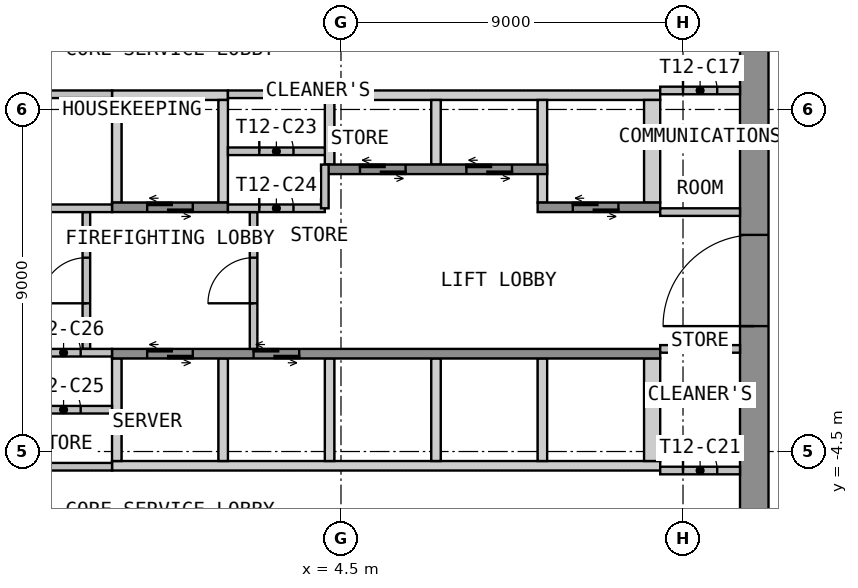
"""IFC4 building model, lengths in metres.
Left out: names, types, materials, properties, quantities, classifications, styles, units other than length and angle.
Written with IfcOpenShell. Run it as: python <this file> out.ifc"""

import sys

from ifc_helpers import new_model, si_unit, direction, frame, frame_2d, origin, place, context, subcontext, project, spatial, polyline, rectangle, outline, extrude, element, fill, save


model = new_model("IFC4")
c1 = context("Model", 3, precision=1e-05, world=origin(), true_north=direction((0.0, 1.0)))
c2 = subcontext(c1, "Body", "Model", "MODEL_VIEW")
j1 = project(units=[si_unit("LENGTHUNIT", "METRE"), si_unit("PLANEANGLEUNIT", "RADIAN")], contexts=[c1])
p1 = place(None, origin())
s1 = spatial("IfcSite", under=j1, at=p1, CompositionType="ELEMENT")
p2 = place(p1, origin())
s2 = spatial("IfcBuilding", under=s1, at=p2, CompositionType="ELEMENT")
p3 = place(p2, frame((0.0, 0.0, 167.7)))
s3 = spatial("IfcBuildingStorey", under=s2, at=p3, CompositionType="ELEMENT", Elevation=167.7)
p4 = place(p3, frame((15.375, -12.75, 0.0), z_axis=(0.0, 0.0, 1.0), x_axis=(0.0, 1.0, 0.0)))
e1 = element("IfcWall", 1, at=p4, inside=s3, PredefinedType="SHEAR", context=c2, shape_type="SweptSolid", body=[
    extrude(rectangle(XDim=25.5, YDim=0.75, at=frame_2d((12.75, 0.0))), origin(), (0.0, 0.0, 1.0), 3.575),
])
p5 = place(p4, frame((11.55, 0.0, 0.0)))
e2 = element("IfcOpeningElement", 2, at=p5, cuts=e1, PredefinedType="OPENING", context=c2, shape_type="SweptSolid", body=[
    extrude(rectangle(XDim=2.4, YDim=2.1, at=frame_2d((1.2, 1.05))), frame((0.0, 0.385, 0.0), z_axis=(0.0, -1.0, 0.0), x_axis=(1.0, 0.0, 0.0)), (0.0, 0.0, 1.0), 0.77),
])
p6 = place(p3, origin())
e3 = element("IfcWall", 3, at=p6, inside=s3, PredefinedType="SHEAR", context=c2, shape_type="SweptSolid", body=[
    extrude(outline(polyline([(-1.525, 4.75), (1.525, 4.75), (1.525, 5.0), (-1.525, 5.0), (-1.525, 4.75)])), origin(), (0.0, 0.0, 1.0), 3.575),
])
p7 = place(p3, origin())
e4 = element("IfcWall", 4, at=p7, inside=s3, PredefinedType="SHEAR", context=c2, shape_type="SweptSolid", body=[
    extrude(outline(polyline([(4.075, 4.75), (12.9, 4.75), (12.9, 5.0), (4.075, 5.0), (4.075, 4.75)])), origin(), (0.0, 0.0, 1.0), 3.575),
])
p8 = place(p3, origin())
e5 = element("IfcWall", 5, at=p8, inside=s3, PredefinedType="SHEAR", context=c2, shape_type="SweptSolid", body=[
    extrude(outline(polyline([(-1.525, 2.05), (-1.275, 2.05), (-1.275, 4.75), (-1.525, 4.75), (-1.525, 2.05)])), origin(), (0.0, 0.0, 1.0), 3.575),
])
p9 = place(p3, origin())
e6 = element("IfcWall", 6, at=p9, inside=s3, PredefinedType="SHEAR", context=c2, shape_type="SweptSolid", body=[
    extrude(outline(polyline([(1.275, 2.05), (1.525, 2.05), (1.525, 4.75), (1.275, 4.75), (1.275, 2.05)])), origin(), (0.0, 0.0, 1.0), 3.575),
])
p10 = place(p3, origin())
e7 = element("IfcWall", 7, at=p10, inside=s3, PredefinedType="SHEAR", context=c2, shape_type="SweptSolid", body=[
    extrude(outline(polyline([(9.675, 2.05), (9.925, 2.05), (9.925, 4.75), (9.675, 4.75), (9.675, 2.05)])), origin(), (0.0, 0.0, 1.0), 3.575),
])
p11 = place(p3, origin())
e8 = element("IfcWall", 8, at=p11, inside=s3, PredefinedType="SHEAR", context=c2, shape_type="SweptSolid", body=[
    extrude(outline(polyline([(12.475, 2.05), (12.9, 2.05), (12.9, 4.75), (12.475, 4.75), (12.475, 2.05)])), origin(), (0.0, 0.0, 1.0), 3.575),
])
p12 = place(p3, origin())
e9 = element("IfcWall", 9, at=p12, inside=s3, PredefinedType="SHEAR", context=c2, shape_type="SweptSolid", body=[
    extrude(outline(polyline([(4.075, 3.05), (4.325, 3.05), (4.325, 4.75), (4.075, 4.75), (4.075, 3.05)])), origin(), (0.0, 0.0, 1.0), 3.575),
])
p13 = place(p3, origin())
e10 = element("IfcWall", 10, at=p13, inside=s3, PredefinedType="SHEAR", context=c2, shape_type="SweptSolid", body=[
    extrude(outline(polyline([(6.875, 3.05), (7.125, 3.05), (7.125, 4.75), (6.875, 4.75), (6.875, 3.05)])), origin(), (0.0, 0.0, 1.0), 3.575),
])
p14 = place(p3, frame((-1.525, 1.925, 0.0), z_axis=(0.0, 0.0, 1.0), x_axis=(1.0, 0.0, 0.0)))
e11 = element("IfcWall", 11, at=p14, inside=s3, PredefinedType="SHEAR", context=c2, shape_type="SweptSolid", body=[
    extrude(rectangle(XDim=3.05, YDim=0.25, at=frame_2d((1.525, 0.0))), origin(), (0.0, 0.0, 1.0), 3.575),
])
p15 = place(p14, frame((0.925, 0.0, 0.0)))
e12 = element("IfcOpeningElement", 12, at=p15, cuts=e11, PredefinedType="OPENING", context=c2, shape_type="SweptSolid", body=[
    extrude(rectangle(XDim=1.2, YDim=2.1, at=frame_2d((0.6, 1.05))), frame((0.0, 0.135, 0.0), z_axis=(0.0, -1.0, 0.0), x_axis=(1.0, 0.0, 0.0)), (0.0, 0.0, 1.0), 0.27),
])
p16 = place(p3, frame((4.075, 2.925, 0.0), z_axis=(0.0, 0.0, 1.0), x_axis=(1.0, 0.0, 0.0)))
e13 = element("IfcWall", 13, at=p16, inside=s3, PredefinedType="SHEAR", context=c2, shape_type="SweptSolid", body=[
    extrude(rectangle(XDim=5.85, YDim=0.25, at=frame_2d((2.925, 0.0))), origin(), (0.0, 0.0, 1.0), 3.575),
])
p17 = place(p16, frame((0.925, 0.0, 0.0)))
e14 = element("IfcOpeningElement", 14, at=p17, cuts=e13, PredefinedType="OPENING", context=c2, shape_type="SweptSolid", body=[
    extrude(rectangle(XDim=1.2, YDim=2.1, at=frame_2d((0.6, 1.05))), frame((0.0, 0.135, 0.0), z_axis=(0.0, -1.0, 0.0), x_axis=(1.0, 0.0, 0.0)), (0.0, 0.0, 1.0), 0.27),
])
p18 = place(p16, frame((3.725, 0.0, 0.0)))
e15 = element("IfcOpeningElement", 15, at=p18, cuts=e13, PredefinedType="OPENING", context=c2, shape_type="SweptSolid", body=[
    extrude(rectangle(XDim=1.2, YDim=2.1, at=frame_2d((0.6, 1.05))), frame((0.0, 0.135, 0.0), z_axis=(0.0, -1.0, 0.0), x_axis=(1.0, 0.0, 0.0)), (0.0, 0.0, 1.0), 0.27),
])
p19 = place(p3, frame((9.675, 1.925, 0.0), z_axis=(0.0, 0.0, 1.0), x_axis=(1.0, 0.0, 0.0)))
e16 = element("IfcWall", 16, at=p19, inside=s3, PredefinedType="SHEAR", context=c2, shape_type="SweptSolid", body=[
    extrude(rectangle(XDim=3.225, YDim=0.25, at=frame_2d((1.612, 0.0))), origin(), (0.0, 0.0, 1.0), 3.575),
])
p20 = place(p19, frame((0.925, 0.0, 0.0)))
e17 = element("IfcOpeningElement", 17, at=p20, cuts=e16, PredefinedType="OPENING", context=c2, shape_type="SweptSolid", body=[
    extrude(rectangle(XDim=1.2, YDim=2.1, at=frame_2d((0.6, 1.05))), frame((0.0, 0.135, 0.0), z_axis=(0.0, -1.0, 0.0), x_axis=(1.0, 0.0, 0.0)), (0.0, 0.0, 1.0), 0.27),
])
p21 = place(p3, origin())
e18 = element("IfcWall", 18, at=p21, inside=s3, PredefinedType="SHEAR", context=c2, shape_type="SweptSolid", body=[
    extrude(outline(polyline([(-1.525, -5.0), (12.9, -5.0), (12.9, -4.75), (-1.525, -4.75), (-1.525, -5.0)])), origin(), (0.0, 0.0, 1.0), 3.575),
])
p22 = place(p3, origin())
e19 = element("IfcWall", 19, at=p22, inside=s3, PredefinedType="SHEAR", context=c2, shape_type="SweptSolid", body=[
    extrude(outline(polyline([(-1.525, -4.75), (-1.275, -4.75), (-1.275, -2.05), (-1.525, -2.05), (-1.525, -4.75)])), origin(), (0.0, 0.0, 1.0), 3.575),
])
p23 = place(p3, origin())
e20 = element("IfcWall", 20, at=p23, inside=s3, PredefinedType="SHEAR", context=c2, shape_type="SweptSolid", body=[
    extrude(outline(polyline([(1.275, -4.75), (1.525, -4.75), (1.525, -2.05), (1.275, -2.05), (1.275, -4.75)])), origin(), (0.0, 0.0, 1.0), 3.575),
])
p24 = place(p3, origin())
e21 = element("IfcWall", 21, at=p24, inside=s3, PredefinedType="SHEAR", context=c2, shape_type="SweptSolid", body=[
    extrude(outline(polyline([(4.075, -4.75), (4.325, -4.75), (4.325, -2.05), (4.075, -2.05), (4.075, -4.75)])), origin(), (0.0, 0.0, 1.0), 3.575),
])
p25 = place(p3, origin())
e22 = element("IfcWall", 22, at=p25, inside=s3, PredefinedType="SHEAR", context=c2, shape_type="SweptSolid", body=[
    extrude(outline(polyline([(6.875, -4.75), (7.125, -4.75), (7.125, -2.05), (6.875, -2.05), (6.875, -4.75)])), origin(), (0.0, 0.0, 1.0), 3.575),
])
p26 = place(p3, origin())
e23 = element("IfcWall", 23, at=p26, inside=s3, PredefinedType="SHEAR", context=c2, shape_type="SweptSolid", body=[
    extrude(outline(polyline([(9.675, -4.75), (9.925, -4.75), (9.925, -2.05), (9.675, -2.05), (9.675, -4.75)])), origin(), (0.0, 0.0, 1.0), 3.575),
])
p27 = place(p3, origin())
e24 = element("IfcWall", 24, at=p27, inside=s3, PredefinedType="SHEAR", context=c2, shape_type="SweptSolid", body=[
    extrude(outline(polyline([(12.475, -4.75), (12.9, -4.75), (12.9, -2.05), (12.475, -2.05), (12.475, -4.75)])), origin(), (0.0, 0.0, 1.0), 3.575),
])
p28 = place(p3, frame((-1.525, -1.925, 0.0), z_axis=(0.0, 0.0, 1.0), x_axis=(1.0, 0.0, 0.0)))
e25 = element("IfcWall", 25, at=p28, inside=s3, PredefinedType="SHEAR", context=c2, shape_type="SweptSolid", body=[
    extrude(rectangle(XDim=14.425, YDim=0.25, at=frame_2d((7.212, 0.0))), origin(), (0.0, 0.0, 1.0), 3.575),
])
p29 = place(p28, frame((0.925, 0.0, 0.0)))
e26 = element("IfcOpeningElement", 26, at=p29, cuts=e25, PredefinedType="OPENING", context=c2, shape_type="SweptSolid", body=[
    extrude(rectangle(XDim=1.2, YDim=2.1, at=frame_2d((0.6, 1.05))), frame((0.0, 0.135, 0.0), z_axis=(0.0, -1.0, 0.0), x_axis=(1.0, 0.0, 0.0)), (0.0, 0.0, 1.0), 0.27),
])
p30 = place(p28, frame((3.725, 0.0, 0.0)))
e27 = element("IfcOpeningElement", 27, at=p30, cuts=e25, PredefinedType="OPENING", context=c2, shape_type="SweptSolid", body=[
    extrude(rectangle(XDim=1.2, YDim=2.1, at=frame_2d((0.6, 1.05))), frame((0.0, 0.135, 0.0), z_axis=(0.0, -1.0, 0.0), x_axis=(1.0, 0.0, 0.0)), (0.0, 0.0, 1.0), 0.27),
])
p31 = place(p3, frame((-2.2, -1.8, 0.0), z_axis=(0.0, 0.0, 1.0), x_axis=(0.0, 1.0, 0.0)))
e28 = element("IfcWall", 28, at=p31, inside=s3, PredefinedType="PARTITIONING", context=c2, shape_type="SweptSolid", body=[
    extrude(rectangle(XDim=3.6, YDim=0.2, at=frame_2d((1.8, 0.0))), origin(), (0.0, 0.0, 1.0), 3.575),
])
p32 = place(p31, frame((1.2, 0.0, 0.0)))
e29 = element("IfcOpeningElement", 29, at=p32, cuts=e28, PredefinedType="OPENING", context=c2, shape_type="SweptSolid", body=[
    extrude(rectangle(XDim=1.2, YDim=2.1, at=frame_2d((0.6, 1.05))), frame((0.0, 0.11, 0.0), z_axis=(0.0, -1.0, 0.0), x_axis=(1.0, 0.0, 0.0)), (0.0, 0.0, 1.0), 0.22),
])
p33 = place(p3, frame((2.2, -1.8, 0.0), z_axis=(0.0, 0.0, 1.0), x_axis=(0.0, 1.0, 0.0)))
e30 = element("IfcWall", 30, at=p33, inside=s3, PredefinedType="PARTITIONING", context=c2, shape_type="SweptSolid", body=[
    extrude(rectangle(XDim=3.6, YDim=0.2, at=frame_2d((1.8, 0.0))), origin(), (0.0, 0.0, 1.0), 3.575),
])
p34 = place(p33, frame((1.2, 0.0, 0.0)))
e31 = element("IfcOpeningElement", 31, at=p34, cuts=e30, PredefinedType="OPENING", context=c2, shape_type="SweptSolid", body=[
    extrude(rectangle(XDim=1.2, YDim=2.1, at=frame_2d((0.6, 1.05))), frame((0.0, 0.11, 0.0), z_axis=(0.0, -1.0, 0.0), x_axis=(1.0, 0.0, 0.0)), (0.0, 0.0, 1.0), 0.22),
])
p35 = place(p3, frame((12.9, 5.0, 0.0), z_axis=(0.0, 0.0, 1.0), x_axis=(1.0, 0.0, 0.0)))
e32 = element("IfcWall", 32, at=p35, inside=s3, PredefinedType="PARTITIONING", context=c2, shape_type="SweptSolid", body=[
    extrude(rectangle(XDim=2.1, YDim=0.2, at=frame_2d((1.05, 0.0))), origin(), (0.0, 0.0, 1.0), 3.575),
])
p36 = place(p35, frame((0.6, 0.0, 0.0)))
e33 = element("IfcOpeningElement", 33, at=p36, cuts=e32, PredefinedType="OPENING", context=c2, shape_type="SweptSolid", body=[
    extrude(rectangle(XDim=0.9, YDim=2.1, at=frame_2d((0.45, 1.05))), frame((0.0, 0.11, 0.0), z_axis=(0.0, -1.0, 0.0), x_axis=(1.0, 0.0, 0.0)), (0.0, 0.0, 1.0), 0.22),
])
p37 = place(p3, frame((12.9, 1.8, 0.0), z_axis=(0.0, 0.0, 1.0), x_axis=(1.0, 0.0, 0.0)))
e34 = element("IfcWall", 34, at=p37, inside=s3, PredefinedType="PARTITIONING", context=c2, shape_type="SweptSolid", body=[
    extrude(rectangle(XDim=2.1, YDim=0.2, at=frame_2d((1.05, 0.0))), origin(), (0.0, 0.0, 1.0), 3.575),
])
p38 = place(p3, frame((12.9, -5.0, 0.0), z_axis=(0.0, 0.0, 1.0), x_axis=(1.0, 0.0, 0.0)))
e35 = element("IfcWall", 35, at=p38, inside=s3, PredefinedType="PARTITIONING", context=c2, shape_type="SweptSolid", body=[
    extrude(rectangle(XDim=2.1, YDim=0.2, at=frame_2d((1.05, 0.0))), origin(), (0.0, 0.0, 1.0), 3.575),
])
p39 = place(p38, frame((0.6, 0.0, 0.0)))
e36 = element("IfcOpeningElement", 36, at=p39, cuts=e35, PredefinedType="OPENING", context=c2, shape_type="SweptSolid", body=[
    extrude(rectangle(XDim=0.9, YDim=2.1, at=frame_2d((0.45, 1.05))), frame((0.0, 0.11, 0.0), z_axis=(0.0, -1.0, 0.0), x_axis=(1.0, 0.0, 0.0)), (0.0, 0.0, 1.0), 0.22),
])
p40 = place(p3, frame((12.9, -1.8, 0.0), z_axis=(0.0, 0.0, 1.0), x_axis=(1.0, 0.0, 0.0)))
e37 = element("IfcWall", 37, at=p40, inside=s3, PredefinedType="PARTITIONING", context=c2, shape_type="SweptSolid", body=[
    extrude(rectangle(XDim=2.1, YDim=0.2, at=frame_2d((1.05, 0.0))), origin(), (0.0, 0.0, 1.0), 3.575),
])
p41 = place(p3, frame((-12.9, 1.9, 0.0), z_axis=(0.0, 0.0, 1.0), x_axis=(1.0, 0.0, 0.0)))
e38 = element("IfcWall", 38, at=p41, inside=s3, PredefinedType="PARTITIONING", context=c2, shape_type="SweptSolid", body=[
    extrude(rectangle(XDim=11.375, YDim=0.2, at=frame_2d((5.688, 0.0))), origin(), (0.0, 0.0, 1.0), 3.575),
])
p42 = place(p41, frame((5.087, 0.0, 0.0)))
e39 = element("IfcOpeningElement", 39, at=p42, cuts=e38, PredefinedType="OPENING", context=c2, shape_type="SweptSolid", body=[
    extrude(rectangle(XDim=1.2, YDim=2.1, at=frame_2d((0.6, 1.05))), frame((0.0, 0.11, 0.0), z_axis=(0.0, -1.0, 0.0), x_axis=(1.0, 0.0, 0.0)), (0.0, 0.0, 1.0), 0.22),
])
p43 = place(p3, frame((-12.9, 4.9, 0.0), z_axis=(0.0, 0.0, 1.0), x_axis=(1.0, 0.0, 0.0)))
e40 = element("IfcWall", 40, at=p43, inside=s3, PredefinedType="PARTITIONING", context=c2, shape_type="SweptSolid", body=[
    extrude(rectangle(XDim=11.375, YDim=0.2, at=frame_2d((5.688, 0.0))), origin(), (0.0, 0.0, 1.0), 3.575),
])
p44 = place(p3, frame((1.525, 3.4, 0.0), z_axis=(0.0, 0.0, 1.0), x_axis=(1.0, 0.0, 0.0)))
e41 = element("IfcWall", 41, at=p44, inside=s3, PredefinedType="PARTITIONING", context=c2, shape_type="SweptSolid", body=[
    extrude(rectangle(XDim=2.55, YDim=0.2, at=frame_2d((1.275, 0.0))), origin(), (0.0, 0.0, 1.0), 3.575),
])
p45 = place(p44, frame((0.825, 0.0, 0.0)))
e42 = element("IfcOpeningElement", 42, at=p45, cuts=e41, PredefinedType="OPENING", context=c2, shape_type="SweptSolid", body=[
    extrude(rectangle(XDim=0.9, YDim=2.1, at=frame_2d((0.45, 1.05))), frame((0.0, 0.11, 0.0), z_axis=(0.0, -1.0, 0.0), x_axis=(1.0, 0.0, 0.0)), (0.0, 0.0, 1.0), 0.22),
])
p46 = place(p3, frame((1.525, 1.9, 0.0), z_axis=(0.0, 0.0, 1.0), x_axis=(1.0, 0.0, 0.0)))
e43 = element("IfcWall", 43, at=p46, inside=s3, PredefinedType="PARTITIONING", context=c2, shape_type="SweptSolid", body=[
    extrude(rectangle(XDim=2.55, YDim=0.2, at=frame_2d((1.275, 0.0))), origin(), (0.0, 0.0, 1.0), 3.575),
])
p47 = place(p46, frame((0.825, 0.0, 0.0)))
e44 = element("IfcOpeningElement", 44, at=p47, cuts=e43, PredefinedType="OPENING", context=c2, shape_type="SweptSolid", body=[
    extrude(rectangle(XDim=0.9, YDim=2.1, at=frame_2d((0.45, 1.05))), frame((0.0, 0.11, 0.0), z_axis=(0.0, -1.0, 0.0), x_axis=(1.0, 0.0, 0.0)), (0.0, 0.0, 1.0), 0.22),
])
p48 = place(p3, frame((1.525, 4.9, 0.0), z_axis=(0.0, 0.0, 1.0), x_axis=(1.0, 0.0, 0.0)))
e45 = element("IfcWall", 45, at=p48, inside=s3, PredefinedType="PARTITIONING", context=c2, shape_type="SweptSolid", body=[
    extrude(rectangle(XDim=2.55, YDim=0.2, at=frame_2d((1.275, 0.0))), origin(), (0.0, 0.0, 1.0), 3.575),
])
p49 = place(p3, frame((4.075, 1.9, 0.0), z_axis=(0.0, 0.0, 1.0), x_axis=(0.0, 1.0, 0.0)))
e46 = element("IfcWall", 46, at=p49, inside=s3, PredefinedType="PARTITIONING", context=c2, shape_type="SweptSolid", body=[
    extrude(rectangle(XDim=1.15, YDim=0.2, at=frame_2d((0.575, 0.0))), origin(), (0.0, 0.0, 1.0), 3.575),
])
p50 = place(p3, frame((-4.075, -3.4, 0.0), z_axis=(0.0, 0.0, 1.0), x_axis=(1.0, 0.0, 0.0)))
e47 = element("IfcWall", 47, at=p50, inside=s3, PredefinedType="PARTITIONING", context=c2, shape_type="SweptSolid", body=[
    extrude(rectangle(XDim=2.55, YDim=0.2, at=frame_2d((1.275, 0.0))), origin(), (0.0, 0.0, 1.0), 3.575),
])
p51 = place(p50, frame((0.825, 0.0, 0.0)))
e48 = element("IfcOpeningElement", 48, at=p51, cuts=e47, PredefinedType="OPENING", context=c2, shape_type="SweptSolid", body=[
    extrude(rectangle(XDim=0.9, YDim=2.1, at=frame_2d((0.45, 1.05))), frame((0.0, 0.11, 0.0), z_axis=(0.0, -1.0, 0.0), x_axis=(1.0, 0.0, 0.0)), (0.0, 0.0, 1.0), 0.22),
])
p52 = place(p3, frame((-4.075, -1.9, 0.0), z_axis=(0.0, 0.0, 1.0), x_axis=(1.0, 0.0, 0.0)))
e49 = element("IfcWall", 49, at=p52, inside=s3, PredefinedType="PARTITIONING", context=c2, shape_type="SweptSolid", body=[
    extrude(rectangle(XDim=2.55, YDim=0.2, at=frame_2d((1.275, 0.0))), origin(), (0.0, 0.0, 1.0), 3.575),
])
p53 = place(p52, frame((0.825, 0.0, 0.0)))
e50 = element("IfcOpeningElement", 50, at=p53, cuts=e49, PredefinedType="OPENING", context=c2, shape_type="SweptSolid", body=[
    extrude(rectangle(XDim=0.9, YDim=2.1, at=frame_2d((0.45, 1.05))), frame((0.0, 0.11, 0.0), z_axis=(0.0, -1.0, 0.0), x_axis=(1.0, 0.0, 0.0)), (0.0, 0.0, 1.0), 0.22),
])
p54 = place(p3, frame((-4.075, -4.9, 0.0), z_axis=(0.0, 0.0, 1.0), x_axis=(1.0, 0.0, 0.0)))
e51 = element("IfcWall", 51, at=p54, inside=s3, PredefinedType="PARTITIONING", context=c2, shape_type="SweptSolid", body=[
    extrude(rectangle(XDim=2.55, YDim=0.2, at=frame_2d((1.275, 0.0))), origin(), (0.0, 0.0, 1.0), 3.575),
])
p55 = place(p5, origin())
e52 = element("IfcDoor", 52, at=p55, inside=s3, OperationType="DOUBLE_DOOR_DOUBLE_SWING", PredefinedType="DOOR", context=c2, shape_type="SweptSolid", body=[
    extrude(rectangle(XDim=2.4, YDim=2.1, at=frame_2d((1.2, 1.05))), frame((0.0, 0.025, 0.0), z_axis=(0.0, -1.0, 0.0), x_axis=(1.0, 0.0, 0.0)), (0.0, 0.0, 1.0), 0.05),
])
fill(e2, e52)
p56 = place(p15, origin())
e53 = element("IfcDoor", 53, at=p56, inside=s3, OperationType="DOUBLE_DOOR_SLIDING", PredefinedType="DOOR", context=c2, shape_type="SweptSolid", body=[
    extrude(rectangle(XDim=1.2, YDim=2.1, at=frame_2d((0.6, 1.05))), frame((0.0, 0.025, 0.0), z_axis=(0.0, -1.0, 0.0), x_axis=(1.0, 0.0, 0.0)), (0.0, 0.0, 1.0), 0.05),
])
fill(e12, e53)
p57 = place(p17, origin())
e54 = element("IfcDoor", 54, at=p57, inside=s3, OperationType="DOUBLE_DOOR_SLIDING", PredefinedType="DOOR", context=c2, shape_type="SweptSolid", body=[
    extrude(rectangle(XDim=1.2, YDim=2.1, at=frame_2d((0.6, 1.05))), frame((0.0, 0.025, 0.0), z_axis=(0.0, -1.0, 0.0), x_axis=(1.0, 0.0, 0.0)), (0.0, 0.0, 1.0), 0.05),
])
fill(e14, e54)
p58 = place(p18, origin())
e55 = element("IfcDoor", 55, at=p58, inside=s3, OperationType="DOUBLE_DOOR_SLIDING", PredefinedType="DOOR", context=c2, shape_type="SweptSolid", body=[
    extrude(rectangle(XDim=1.2, YDim=2.1, at=frame_2d((0.6, 1.05))), frame((0.0, 0.025, 0.0), z_axis=(0.0, -1.0, 0.0), x_axis=(1.0, 0.0, 0.0)), (0.0, 0.0, 1.0), 0.05),
])
fill(e15, e55)
p59 = place(p20, origin())
e56 = element("IfcDoor", 56, at=p59, inside=s3, OperationType="DOUBLE_DOOR_SLIDING", PredefinedType="DOOR", context=c2, shape_type="SweptSolid", body=[
    extrude(rectangle(XDim=1.2, YDim=2.1, at=frame_2d((0.6, 1.05))), frame((0.0, 0.025, 0.0), z_axis=(0.0, -1.0, 0.0), x_axis=(1.0, 0.0, 0.0)), (0.0, 0.0, 1.0), 0.05),
])
fill(e17, e56)
p60 = place(p29, origin())
e57 = element("IfcDoor", 57, at=p60, inside=s3, OperationType="DOUBLE_DOOR_SLIDING", PredefinedType="DOOR", context=c2, shape_type="SweptSolid", body=[
    extrude(rectangle(XDim=1.2, YDim=2.1, at=frame_2d((0.6, 1.05))), frame((0.0, 0.025, 0.0), z_axis=(0.0, -1.0, 0.0), x_axis=(1.0, 0.0, 0.0)), (0.0, 0.0, 1.0), 0.05),
])
fill(e26, e57)
p61 = place(p30, origin())
e58 = element("IfcDoor", 58, at=p61, inside=s3, OperationType="DOUBLE_DOOR_SLIDING", PredefinedType="DOOR", context=c2, shape_type="SweptSolid", body=[
    extrude(rectangle(XDim=1.2, YDim=2.1, at=frame_2d((0.6, 1.05))), frame((0.0, 0.025, 0.0), z_axis=(0.0, -1.0, 0.0), x_axis=(1.0, 0.0, 0.0)), (0.0, 0.0, 1.0), 0.05),
])
fill(e27, e58)
p62 = place(p32, origin())
e59 = element("IfcDoor", 59, at=p62, inside=s3, OperationType="SINGLE_SWING_LEFT", PredefinedType="DOOR", context=c2, shape_type="SweptSolid", body=[
    extrude(rectangle(XDim=1.2, YDim=2.1, at=frame_2d((0.6, 1.05))), frame((0.0, 0.025, 0.0), z_axis=(0.0, -1.0, 0.0), x_axis=(1.0, 0.0, 0.0)), (0.0, 0.0, 1.0), 0.05),
])
fill(e29, e59)
p63 = place(p34, origin())
e60 = element("IfcDoor", 60, at=p63, inside=s3, OperationType="SINGLE_SWING_LEFT", PredefinedType="DOOR", context=c2, shape_type="SweptSolid", body=[
    extrude(rectangle(XDim=1.2, YDim=2.1, at=frame_2d((0.6, 1.05))), frame((0.0, 0.025, 0.0), z_axis=(0.0, -1.0, 0.0), x_axis=(1.0, 0.0, 0.0)), (0.0, 0.0, 1.0), 0.05),
])
fill(e31, e60)
p64 = place(p36, origin())
e61 = element("IfcDoor", 61, at=p64, inside=s3, OperationType="SINGLE_SWING_LEFT", PredefinedType="DOOR", context=c2, shape_type="SweptSolid", body=[
    extrude(rectangle(XDim=0.9, YDim=2.1, at=frame_2d((0.45, 1.05))), frame((0.0, 0.025, 0.0), z_axis=(0.0, -1.0, 0.0), x_axis=(1.0, 0.0, 0.0)), (0.0, 0.0, 1.0), 0.05),
])
fill(e33, e61)
p65 = place(p39, origin())
e62 = element("IfcDoor", 62, at=p65, inside=s3, OperationType="SINGLE_SWING_LEFT", PredefinedType="DOOR", context=c2, shape_type="SweptSolid", body=[
    extrude(rectangle(XDim=0.9, YDim=2.1, at=frame_2d((0.45, 1.05))), frame((0.0, 0.025, 0.0), z_axis=(0.0, -1.0, 0.0), x_axis=(1.0, 0.0, 0.0)), (0.0, 0.0, 1.0), 0.05),
])
fill(e36, e62)
p66 = place(p45, origin())
e63 = element("IfcDoor", 63, at=p66, inside=s3, OperationType="SINGLE_SWING_LEFT", PredefinedType="DOOR", context=c2, shape_type="SweptSolid", body=[
    extrude(rectangle(XDim=0.9, YDim=2.1, at=frame_2d((0.45, 1.05))), frame((0.0, 0.025, 0.0), z_axis=(0.0, -1.0, 0.0), x_axis=(1.0, 0.0, 0.0)), (0.0, 0.0, 1.0), 0.05),
])
fill(e42, e63)
p67 = place(p47, origin())
e64 = element("IfcDoor", 64, at=p67, inside=s3, OperationType="SINGLE_SWING_LEFT", PredefinedType="DOOR", context=c2, shape_type="SweptSolid", body=[
    extrude(rectangle(XDim=0.9, YDim=2.1, at=frame_2d((0.45, 1.05))), frame((0.0, 0.025, 0.0), z_axis=(0.0, -1.0, 0.0), x_axis=(1.0, 0.0, 0.0)), (0.0, 0.0, 1.0), 0.05),
])
fill(e44, e64)
p68 = place(p51, origin())
e65 = element("IfcDoor", 65, at=p68, inside=s3, OperationType="SINGLE_SWING_LEFT", PredefinedType="DOOR", context=c2, shape_type="SweptSolid", body=[
    extrude(rectangle(XDim=0.9, YDim=2.1, at=frame_2d((0.45, 1.05))), frame((0.0, 0.025, 0.0), z_axis=(0.0, -1.0, 0.0), x_axis=(1.0, 0.0, 0.0)), (0.0, 0.0, 1.0), 0.05),
])
fill(e48, e65)
p69 = place(p53, origin())
e66 = element("IfcDoor", 66, at=p69, inside=s3, OperationType="SINGLE_SWING_LEFT", PredefinedType="DOOR", context=c2, shape_type="SweptSolid", body=[
    extrude(rectangle(XDim=0.9, YDim=2.1, at=frame_2d((0.45, 1.05))), frame((0.0, 0.025, 0.0), z_axis=(0.0, -1.0, 0.0), x_axis=(1.0, 0.0, 0.0)), (0.0, 0.0, 1.0), 0.05),
])
fill(e50, e66)
save(model, sys.argv[1])
